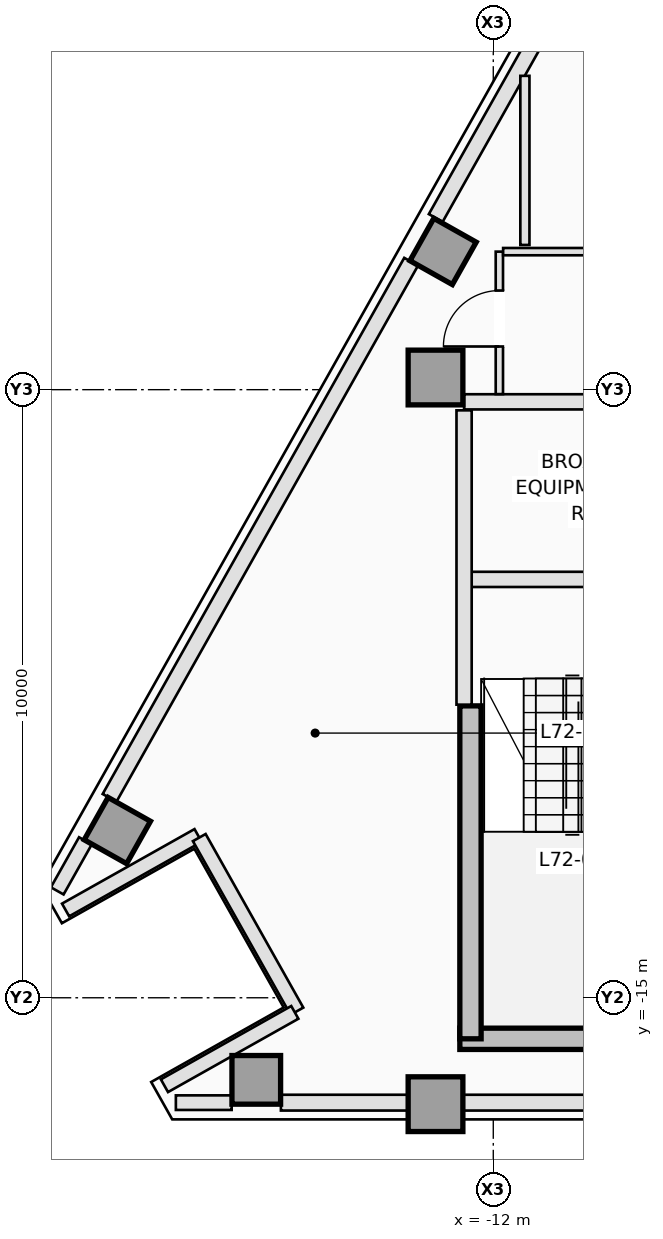
"""IFC4 building model, lengths in metres.
Left out: names, types, materials, properties, quantities, classifications, styles, units other than length and angle.
Written with IfcOpenShell. Run it as: python <this file> out.ifc"""

import sys

from ifc_helpers import new_model, si_unit, direction, frame, frame_2d, origin, origin_2d, place, context, subcontext, project, spatial, rectangle, extrude, element, fill, save


model = new_model("IFC4")
c1 = context("Model", 3, precision=1e-05, world=origin(), true_north=direction((0.0, 1.0)))
c2 = subcontext(c1, "Body", "Model", "MODEL_VIEW")
j1 = project(units=[si_unit("LENGTHUNIT", "METRE"), si_unit("PLANEANGLEUNIT", "RADIAN")], contexts=[c1])
p1 = place(None, origin())
s1 = spatial("IfcSite", under=j1, at=p1, CompositionType="ELEMENT")
p2 = place(p1, origin())
s2 = spatial("IfcBuilding", under=s1, at=p2, CompositionType="ELEMENT")
p3 = place(p2, frame((0.0, 0.0, 260.4)))
s3 = spatial("IfcBuildingStorey", under=s2, at=p3, CompositionType="ELEMENT", Elevation=260.4)
p4 = place(p3, frame((-12.55, -15.675, 0.0), z_axis=(0.0, 0.0, 1.0), x_axis=(1.0, 0.0, 0.0)))
e1 = element("IfcWall", 1, at=p4, inside=s3, PredefinedType="SHEAR", context=c2, shape_type="SweptSolid", body=[
    extrude(rectangle(XDim=3.7, YDim=0.35, at=frame_2d((1.85, 0.0))), origin(), (0.0, 0.0, 1.0), 3.5),
])
p5 = place(p3, frame((-12.375, -15.675, 0.0), z_axis=(0.0, 0.0, 1.0), x_axis=(0.0, 1.0, 0.0)))
e2 = element("IfcWall", 2, at=p5, inside=s3, PredefinedType="SHEAR", context=c2, shape_type="SweptSolid", body=[
    extrude(rectangle(XDim=5.475, YDim=0.35, at=frame_2d((2.738, 0.0))), origin(), (0.0, 0.0, 1.0), 3.5),
])
for number, where, z_axis, x_axis in (
    (3, (-12.95, -16.75, 0.0), (0.0, 0.0, 1.0), (1.0, 0.0, 0.0)),
    (4, (-12.95, -4.8, 0.0), (0.0, 0.0, 1.0), (1.0, 0.0, 0.0)),
):
    element("IfcColumn", number, at=place(p3, frame(where, z_axis=z_axis, x_axis=x_axis)), inside=s3, PredefinedType="COLUMN", context=c2, shape_type="SweptSolid", body=[
        extrude(rectangle(XDim=0.9, YDim=0.9, at=origin_2d()), origin(), (0.0, 0.0, 1.0), 3.5),
    ])
for number, where, z_axis, x_axis in (
    (5, (-15.898, -16.35, 0.0), (0.0, 0.0, 1.0), (0.0, 1.0, 0.0)),
    (6, (-12.825, -2.727, 0.0), (0.0, 0.0, 1.0), (-0.872, 0.49, 0.0)),
    (7, (-18.182, -12.25, 0.0), (0.0, 0.0, 1.0), (-0.872, 0.49, 0.0)),
):
    element("IfcColumn", number, at=place(p3, frame(where, z_axis=z_axis, x_axis=x_axis)), inside=s3, PredefinedType="COLUMN", context=c2, shape_type="SweptSolid", body=[
        extrude(rectangle(XDim=0.8, YDim=0.8, at=origin_2d()), origin(), (0.0, 0.0, 1.0), 3.5),
    ])
p6 = place(p3, frame((-16.302, -16.725, 0.0), z_axis=(0.0, 0.0, 1.0), x_axis=(-1.0, 0.0, 0.0)))
e8 = element("IfcWall", 8, at=p6, inside=s3, PredefinedType="STANDARD", context=c2, shape_type="SweptSolid", body=[
    extrude(rectangle(XDim=0.917, YDim=0.24, at=frame_2d((0.459, 0.0))), origin(), (0.0, 0.0, 1.0), 3.25),
])
p7 = place(p3, frame((-4.22, -16.725, 0.0), z_axis=(0.0, 0.0, 1.0), x_axis=(-1.0, 0.0, 0.0)))
e9 = element("IfcWall", 9, at=p7, inside=s3, PredefinedType="STANDARD", context=c2, shape_type="SweptSolid", body=[
    extrude(rectangle(XDim=11.273, YDim=0.26, at=frame_2d((5.636, 0.0))), origin(), (0.0, 0.0, 1.0), 2.79),
])
p8 = place(p3, frame((-19.171, -13.242, 0.0), z_axis=(0.0, 0.0, 1.0), x_axis=(0.490199895283, 0.871610040479, 0.0)))
e10 = element("IfcWall", 10, at=p8, inside=s3, PredefinedType="STANDARD", context=c2, shape_type="SweptSolid", body=[
    extrude(rectangle(XDim=0.945, YDim=0.24, at=frame_2d((0.472, 0.0))), origin(), (0.0, 0.0, 1.0), 3.25),
])
p9 = place(p3, frame((-18.311, -11.713, 0.0), z_axis=(0.0, 0.0, 1.0), x_axis=(0.490266968583, 0.871572314565, 0.0)))
e11 = element("IfcWall", 11, at=p9, inside=s3, PredefinedType="STANDARD", context=c2, shape_type="SweptSolid", body=[
    extrude(rectangle(XDim=10.116, YDim=0.26, at=frame_2d((5.058, 0.0))), origin(), (0.0, 0.0, 1.0), 3.25),
])
p10 = place(p3, frame((-12.946, -2.177, 0.0), z_axis=(0.0, 0.0, 1.0), x_axis=(0.490244825075, 0.871584770109, 0.0)))
e12 = element("IfcWall", 12, at=p10, inside=s3, PredefinedType="STANDARD", context=c2, shape_type="SweptSolid", body=[
    extrude(rectangle(XDim=4.237, YDim=0.26, at=frame_2d((2.119, 0.0))), origin(), (0.0, 0.0, 1.0), 3.25),
])
p11 = place(p3, frame((-19.033, -13.556, 0.0), z_axis=(0.0, 0.0, 1.0), x_axis=(0.871588577066, 0.490238056792, 0.0)))
e13 = element("IfcWall", 13, at=p11, inside=s3, PredefinedType="STANDARD", context=c2, shape_type="SweptSolid", body=[
    extrude(rectangle(XDim=2.5, YDim=0.24, at=frame_2d((1.25, 0.0))), origin(), (0.0, 0.0, 1.0), 3.25),
])
p12 = place(p3, frame((-16.835, -12.366, 0.0), z_axis=(0.0, 0.0, 1.0), x_axis=(0.490293083368, -0.871557624258, 0.0)))
e14 = element("IfcWall", 14, at=p12, inside=s3, PredefinedType="STANDARD", context=c2, shape_type="SweptSolid", body=[
    extrude(rectangle(XDim=3.276, YDim=0.24, at=frame_2d((1.638, 0.0))), origin(), (0.0, 0.0, 1.0), 2.79),
])
p13 = place(p3, frame((-15.264, -15.24, 0.0), z_axis=(0.0, 0.0, 1.0), x_axis=(-0.87157023615, -0.490270663468, 0.0)))
e15 = element("IfcWall", 15, at=p13, inside=s3, PredefinedType="STANDARD", context=c2, shape_type="SweptSolid", body=[
    extrude(rectangle(XDim=2.46, YDim=0.24, at=frame_2d((1.23, 0.0))), origin(), (0.0, 0.0, 1.0), 3.25),
])
p14 = place(p3, frame((-12.38, -8.12, 0.0), z_axis=(0.0, 0.0, 1.0), x_axis=(1.0, 0.0, 0.0)))
e16 = element("IfcWall", 16, at=p14, inside=s3, PredefinedType="PARTITIONING", context=c2, shape_type="SweptSolid", body=[
    extrude(rectangle(XDim=3.22, YDim=0.25, at=frame_2d((1.61, 0.0))), origin(), (0.0, 0.0, 1.0), 3.25),
])
p15 = place(p3, frame((-12.48, -10.18, 0.0), z_axis=(0.0, 0.0, 1.0), x_axis=(0.0, 1.0, 0.0)))
e17 = element("IfcWall", 17, at=p15, inside=s3, PredefinedType="PARTITIONING", context=c2, shape_type="SweptSolid", body=[
    extrude(rectangle(XDim=4.84, YDim=0.25, at=frame_2d((2.42, 0.0))), origin(), (0.0, 0.0, 1.0), 3.25),
])
p16 = place(p3, frame((-12.48, -5.2, 0.0), z_axis=(0.0, 0.0, 1.0), x_axis=(1.0, 0.0, 0.0)))
e18 = element("IfcWall", 18, at=p16, inside=s3, PredefinedType="PARTITIONING", context=c2, shape_type="SweptSolid", body=[
    extrude(rectangle(XDim=8.278, YDim=0.25, at=frame_2d((4.139, 0.0))), origin(), (0.0, 0.0, 1.0), 3.25),
])
p17 = place(p16, frame((3.05, 0.0, 0.0)))
e19 = element("IfcOpeningElement", 19, at=p17, cuts=e18, PredefinedType="OPENING", context=c2, shape_type="SweptSolid", body=[
    extrude(rectangle(XDim=0.92, YDim=2.12, at=frame_2d((0.46, 1.06))), frame((0.0, 0.135, 0.0), z_axis=(0.0, -1.0, 0.0), x_axis=(1.0, 0.0, 0.0)), (0.0, 0.0, 1.0), 0.27),
])
p18 = place(p16, frame((6.15, 0.0, 0.0)))
e20 = element("IfcOpeningElement", 20, at=p18, cuts=e18, PredefinedType="OPENING", context=c2, shape_type="SweptSolid", body=[
    extrude(rectangle(XDim=0.92, YDim=2.12, at=frame_2d((0.46, 1.06))), frame((0.0, 0.135, 0.0), z_axis=(0.0, -1.0, 0.0), x_axis=(1.0, 0.0, 0.0)), (0.0, 0.0, 1.0), 0.27),
])
p19 = place(p3, frame((-11.9, -5.073, 0.0), z_axis=(0.0, 0.0, 1.0), x_axis=(0.0, 1.0, 0.0)))
e21 = element("IfcWall", 21, at=p19, inside=s3, PredefinedType="PARTITIONING", context=c2, shape_type="SweptSolid", body=[
    extrude(rectangle(XDim=2.343, YDim=0.12, at=frame_2d((1.171, 0.0))), origin(), (0.0, 0.0, 1.0), 3.25),
])
p20 = place(p19, frame((0.783, 0.0, 0.0)))
e22 = element("IfcOpeningElement", 22, at=p20, cuts=e21, PredefinedType="OPENING", context=c2, shape_type="SweptSolid", body=[
    extrude(rectangle(XDim=0.92, YDim=2.12, at=frame_2d((0.46, 1.06))), frame((0.0, 0.07, 0.0), z_axis=(0.0, -1.0, 0.0), x_axis=(1.0, 0.0, 0.0)), (0.0, 0.0, 1.0), 0.14),
])
p21 = place(p3, frame((-11.838, -2.73, 0.0), z_axis=(0.0, 0.0, 1.0), x_axis=(1.0, 0.0, 0.0)))
e23 = element("IfcWall", 23, at=p21, inside=s3, PredefinedType="PARTITIONING", context=c2, shape_type="SweptSolid", body=[
    extrude(rectangle(XDim=3.268, YDim=0.12, at=frame_2d((1.634, 0.0))), origin(), (0.0, 0.0, 1.0), 3.25),
])
p22 = place(p3, frame((-11.48, -2.62, 0.0), z_axis=(0.0, 0.0, 1.0), x_axis=(0.0, 1.0, 0.0)))
e24 = element("IfcWall", 24, at=p22, inside=s3, PredefinedType="PARTITIONING", context=c2, shape_type="SweptSolid", body=[
    extrude(rectangle(XDim=2.781, YDim=0.15, at=frame_2d((1.391, 0.0))), origin(), (0.0, 0.0, 1.0), 3.25),
])
p23 = place(p20, origin())
e25 = element("IfcDoor", 25, at=p23, inside=s3, OperationType="SINGLE_SWING_LEFT", PredefinedType="DOOR", context=c2, shape_type="SweptSolid", body=[
    extrude(rectangle(XDim=0.92, YDim=2.12, at=frame_2d((0.46, 1.06))), frame((0.0, 0.025, 0.0), z_axis=(0.0, -1.0, 0.0), x_axis=(1.0, 0.0, 0.0)), (0.0, 0.0, 1.0), 0.05),
])
fill(e22, e25)
save(model, sys.argv[1])
